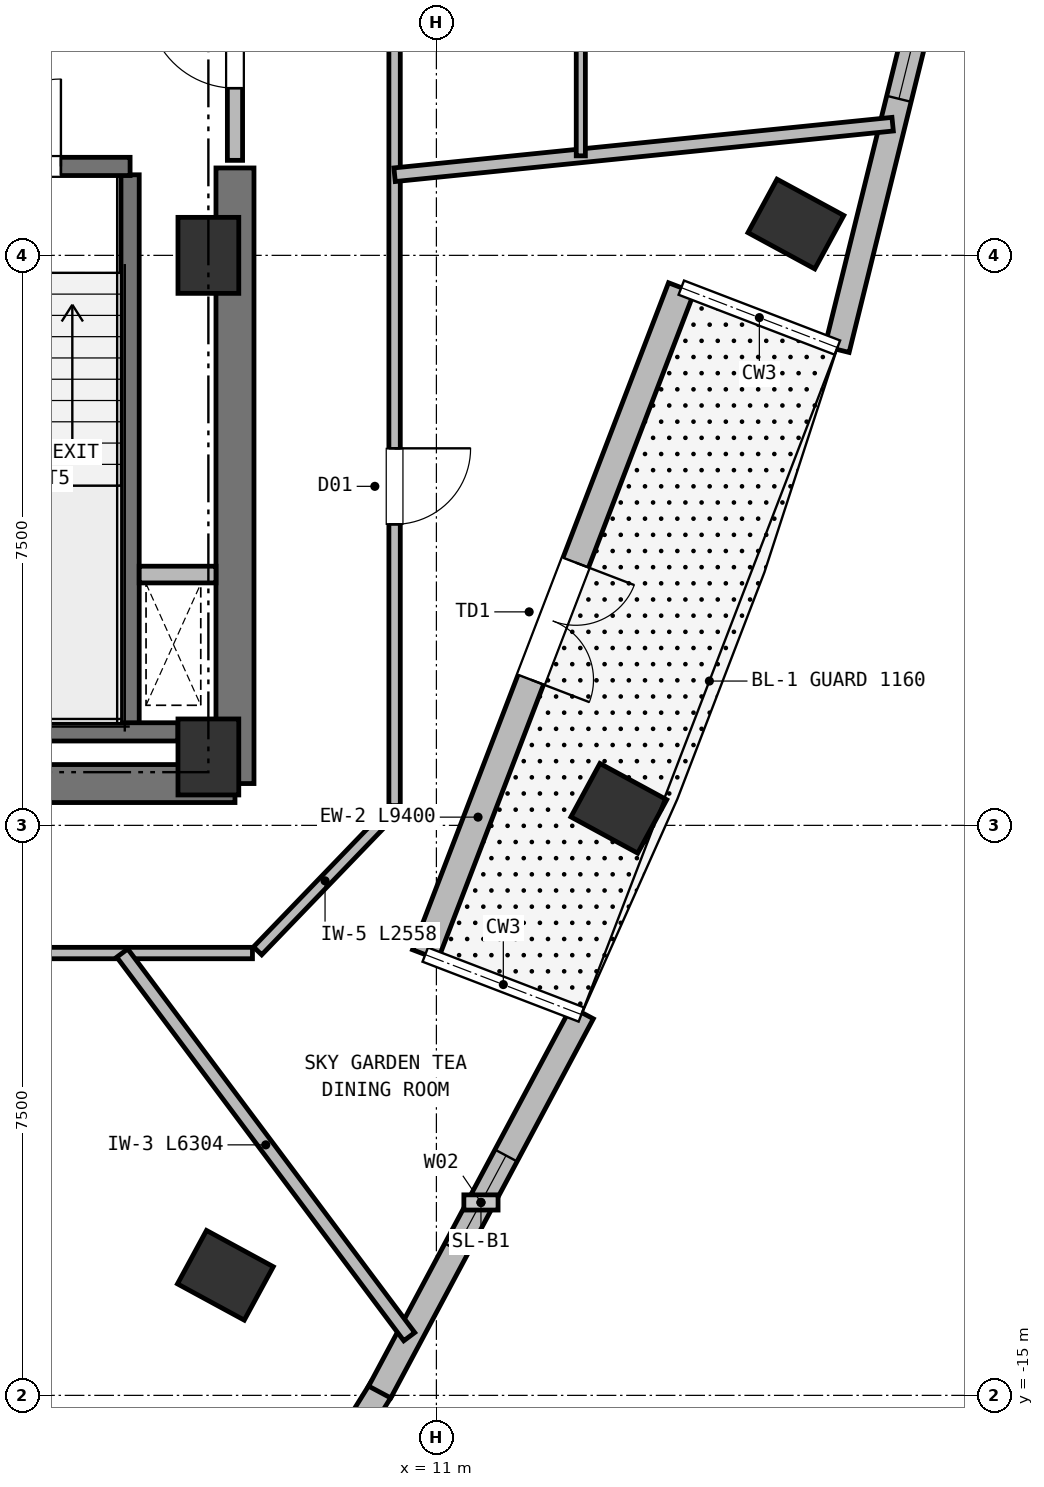
"""IFC4 building model, lengths in metres.
Left out: names, types, materials, properties, quantities, classifications, styles, units other than length and angle.
Written with IfcOpenShell. Run it as: python <this file> out.ifc"""

import sys

from ifc_helpers import new_model, si_unit, direction, frame, frame_2d, origin, origin_2d, place, context, subcontext, project, spatial, rectangle, extrude, element, fill, save


model = new_model("IFC4")
c1 = context("Model", 3, precision=1e-05, world=origin(), true_north=direction((0.0, 1.0)))
c2 = subcontext(c1, "Body", "Model", "MODEL_VIEW")
j1 = project(units=[si_unit("LENGTHUNIT", "METRE"), si_unit("PLANEANGLEUNIT", "RADIAN")], contexts=[c1])
p1 = place(None, origin())
s1 = spatial("IfcSite", under=j1, at=p1, CompositionType="ELEMENT")
p2 = place(p1, origin())
s2 = spatial("IfcBuilding", under=s1, at=p2, CompositionType="ELEMENT")
p3 = place(p2, frame((0.0, 0.0, 239.75)))
s3 = spatial("IfcBuildingStorey", under=s2, at=p3, CompositionType="ELEMENT", Elevation=239.75)
for number, where, z_axis, x_axis in (
    (1, (8.0, -6.6, 0.0), (0.0, 0.0, 1.0), (1.0, 0.0, 0.0)),
    (2, (8.0, 0.0, 0.0), (0.0, 0.0, 1.0), (1.0, 0.0, 0.0)),
):
    element("IfcColumn", number, at=place(p3, frame(where, z_axis=z_axis, x_axis=x_axis)), inside=s3, PredefinedType="COLUMN", context=c2, shape_type="SweptSolid", body=[
        extrude(rectangle(XDim=0.8, YDim=1.0, at=origin_2d()), origin(), (0.0, 0.0, 1.0), 3.8),
    ])
p4 = place(p3, frame((4.4, -6.95, 0.0), z_axis=(0.0, 0.0, 1.0), x_axis=(1.0, 0.0, 0.0)))
e3 = element("IfcWall", 3, at=p4, inside=s3, PredefinedType="SHEAR", context=c2, shape_type="SweptSolid", body=[
    extrude(rectangle(XDim=3.95, YDim=0.5, at=frame_2d((1.975, 0.0))), origin(), (0.0, 0.0, 1.0), 3.55),
])
p5 = place(p3, frame((8.35, -6.95, 0.0), z_axis=(0.0, 0.0, 1.0), x_axis=(0.0, 1.0, 0.0)))
e4 = element("IfcWall", 4, at=p5, inside=s3, PredefinedType="SHEAR", context=c2, shape_type="SweptSolid", body=[
    extrude(rectangle(XDim=8.1, YDim=0.5, at=frame_2d((4.05, 0.0))), origin(), (0.0, 0.0, 1.0), 3.55),
])
for number, where, z_axis, x_axis in (
    (5, (8.224, -13.42, 0.0), (0.0, 0.0, 1.0), (0.477, 0.879, 0.0)),
    (6, (13.4, -7.276, 0.0), (0.0, 0.0, 1.0), (0.477, 0.879, 0.0)),
    (7, (15.73, 0.412, 0.0), (0.0, 0.0, 1.0), (0.477, 0.879, 0.0)),
):
    element("IfcColumn", number, at=place(p3, frame(where, z_axis=z_axis, x_axis=x_axis)), inside=s3, PredefinedType="COLUMN", context=c2, shape_type="SweptSolid", body=[
        extrude(rectangle(XDim=0.8, YDim=1.0, at=origin_2d()), origin(), (0.0, 0.0, 1.0), 3.8),
    ])
p6 = place(p3, frame((14.222, -0.425, 0.0), z_axis=(0.0, 0.0, 1.0), x_axis=(-0.358368113904, -0.933580363406, 0.0)))
e8 = element("IfcWall", 8, at=p6, inside=s3, PredefinedType="SOLIDWALL", context=c2, shape_type="SweptSolid", body=[
    extrude(rectangle(XDim=9.4, YDim=0.36, at=frame_2d((4.7, 0.0))), origin(), (0.0, 0.0, 1.0), 3.23),
])
p7 = place(p6, frame((3.875, 0.0, 0.0)))
e9 = element("IfcOpeningElement", 9, at=p7, cuts=e8, PredefinedType="OPENING", context=c2, shape_type="SweptSolid", body=[
    extrude(rectangle(XDim=1.65, YDim=2.25, at=frame_2d((0.825, 1.125))), frame((0.0, 0.19, 0.0), z_axis=(0.0, -1.0, 0.0), x_axis=(1.0, 0.0, 0.0)), (0.0, 0.0, 1.0), 0.38),
])
p8 = place(p3, frame((10.279, -14.913, 0.0), z_axis=(0.0, 0.0, 1.0), x_axis=(-0.527573608848, -0.84950932146, 0.0)))
e10 = element("IfcWall", 10, at=p8, inside=s3, PredefinedType="SOLIDWALL", context=c2, shape_type="SweptSolid", body=[
    extrude(rectangle(XDim=2.509, YDim=0.33, at=frame_2d((1.254, 0.0))), origin(), (0.0, 0.0, 1.0), 3.55),
])
p9 = place(p8, frame((0.554, 0.0, 0.72)))
e11 = element("IfcOpeningElement", 11, at=p9, cuts=e10, PredefinedType="OPENING", context=c2, shape_type="SweptSolid", body=[
    extrude(rectangle(XDim=1.4, YDim=1.84, at=frame_2d((0.7, 0.92))), frame((0.0, 0.175, 0.0), z_axis=(0.0, -1.0, 0.0), x_axis=(1.0, 0.0, 0.0)), (0.0, 0.0, 1.0), 0.35),
])
p10 = place(p3, frame((12.919, -9.967, 0.0), z_axis=(0.0, 0.0, 1.0), x_axis=(-0.471219832314, -0.882015798971, 0.0)))
e12 = element("IfcWall", 12, at=p10, inside=s3, PredefinedType="SOLIDWALL", context=c2, shape_type="SweptSolid", body=[
    extrude(rectangle(XDim=5.657, YDim=0.33, at=frame_2d((2.828, 0.0))), origin(), (0.0, 0.0, 1.0), 3.55),
])
p11 = place(p10, frame((2.128, 0.0, 0.72)))
e13 = element("IfcOpeningElement", 13, at=p11, cuts=e12, PredefinedType="OPENING", context=c2, shape_type="SweptSolid", body=[
    extrude(rectangle(XDim=1.4, YDim=1.88, at=frame_2d((0.7, 0.94))), frame((0.0, 0.175, 0.0), z_axis=(0.0, -1.0, 0.0), x_axis=(1.0, 0.0, 0.0)), (0.0, 0.0, 1.0), 0.35),
])
p12 = place(p3, frame((17.628, 4.254, 0.0), z_axis=(0.0, 0.0, 1.0), x_axis=(-0.240006202067, -0.97077135463, 0.0)))
e14 = element("IfcWall", 14, at=p12, inside=s3, PredefinedType="SOLIDWALL", context=c2, shape_type="SweptSolid", body=[
    extrude(rectangle(XDim=5.657, YDim=0.33, at=frame_2d((2.828, 0.0))), origin(), (0.0, 0.0, 1.0), 3.55),
])
p13 = place(p12, frame((0.86, 0.0, 0.72)))
e15 = element("IfcOpeningElement", 15, at=p13, cuts=e14, PredefinedType="OPENING", context=c2, shape_type="SweptSolid", body=[
    extrude(rectangle(XDim=1.4, YDim=1.88, at=frame_2d((0.7, 0.94))), frame((0.0, 0.175, 0.0), z_axis=(0.0, -1.0, 0.0), x_axis=(1.0, 0.0, 0.0)), (0.0, 0.0, 1.0), 0.35),
])
p14 = place(p3, frame((6.97, -6.16, 0.0), z_axis=(0.0, 0.0, 1.0), x_axis=(0.0, 1.0, 0.0)))
e16 = element("IfcWall", 16, at=p14, inside=s3, PredefinedType="SHEAR", context=c2, shape_type="SweptSolid", body=[
    extrude(rectangle(XDim=7.22, YDim=0.24, at=frame_2d((3.61, 0.0))), origin(), (0.0, 0.0, 1.0), 3.55),
])
p15 = place(p3, frame((4.01, -6.27, 0.0), z_axis=(0.0, 0.0, 1.0), x_axis=(1.0, 0.0, 0.0)))
e17 = element("IfcWall", 17, at=p15, inside=s3, PredefinedType="SHEAR", context=c2, shape_type="SweptSolid", body=[
    extrude(rectangle(XDim=3.59, YDim=0.24, at=frame_2d((1.795, 0.0))), origin(), (0.0, 0.0, 1.0), 3.55),
])
p16 = place(p3, frame((4.01, 1.17, 0.0), z_axis=(0.0, 0.0, 1.0), x_axis=(1.0, 0.0, 0.0)))
e18 = element("IfcWall", 18, at=p16, inside=s3, PredefinedType="SHEAR", context=c2, shape_type="SweptSolid", body=[
    extrude(rectangle(XDim=2.96, YDim=0.24, at=frame_2d((1.48, 0.0))), origin(), (0.0, 0.0, 1.0), 3.55),
])
p17 = place(p16, frame((0.9, 0.0, 0.0)))
e19 = element("IfcOpeningElement", 19, at=p17, cuts=e18, PredefinedType="OPENING", context=c2, shape_type="SweptSolid", body=[
    extrude(rectangle(XDim=1.15, YDim=2.15, at=frame_2d((0.575, 1.075))), frame((0.0, 0.13, 0.0), z_axis=(0.0, -1.0, 0.0), x_axis=(1.0, 0.0, 0.0)), (0.0, 0.0, 1.0), 0.26),
])
p18 = place(p3, frame((7.09, -4.2, 0.0), z_axis=(0.0, 0.0, 1.0), x_axis=(1.0, 0.0, 0.0)))
e20 = element("IfcWall", 20, at=p18, inside=s3, PredefinedType="PARTITIONING", context=c2, shape_type="SweptSolid", body=[
    extrude(rectangle(XDim=1.01, YDim=0.22, at=frame_2d((0.505, 0.0))), origin(), (0.0, 0.0, 1.0), 3.55),
])
p19 = place(p3, frame((8.35, 1.25, 0.0), z_axis=(0.0, 0.0, 1.0), x_axis=(0.0, 1.0, 0.0)))
e21 = element("IfcWall", 21, at=p19, inside=s3, PredefinedType="PARTITIONING", context=c2, shape_type="SweptSolid", body=[
    extrude(rectangle(XDim=5.3, YDim=0.2, at=frame_2d((2.65, 0.0))), origin(), (0.0, 0.0, 1.0), 3.55),
])
p20 = place(p19, frame((0.95, 0.0, 0.0)))
e22 = element("IfcOpeningElement", 22, at=p20, cuts=e21, PredefinedType="OPENING", context=c2, shape_type="SweptSolid", body=[
    extrude(rectangle(XDim=1.15, YDim=2.15, at=frame_2d((0.575, 1.075))), frame((0.0, 0.11, 0.0), z_axis=(0.0, -1.0, 0.0), x_axis=(1.0, 0.0, 0.0)), (0.0, 0.0, 1.0), 0.22),
])
p21 = place(p3, frame((8.58, -9.18, 0.0), z_axis=(0.0, 0.0, 1.0), x_axis=(-1.0, 0.0, 0.0)))
e23 = element("IfcWall", 23, at=p21, inside=s3, PredefinedType="PARTITIONING", context=c2, shape_type="SweptSolid", body=[
    extrude(rectangle(XDim=17.16, YDim=0.15, at=frame_2d((8.58, 0.0))), origin(), (0.0, 0.0, 1.0), 3.23),
])
p22 = place(p21, frame((15.361, 0.0, 0.0)))
e24 = element("IfcOpeningElement", 24, at=p22, cuts=e23, PredefinedType="OPENING", context=c2, shape_type="SweptSolid", body=[
    extrude(rectangle(XDim=1.0, YDim=2.15, at=frame_2d((0.5, 1.075))), frame((0.0, 0.085, 0.0), z_axis=(0.0, -1.0, 0.0), x_axis=(1.0, 0.0, 0.0)), (0.0, 0.0, 1.0), 0.17),
])
p23 = place(p21, frame((12.947, 0.0, 0.0)))
e25 = element("IfcOpeningElement", 25, at=p23, cuts=e23, PredefinedType="OPENING", context=c2, shape_type="SweptSolid", body=[
    extrude(rectangle(XDim=0.95, YDim=2.1, at=frame_2d((0.475, 1.05))), frame((0.0, 0.085, 0.0), z_axis=(0.0, -1.0, 0.0), x_axis=(1.0, 0.0, 0.0)), (0.0, 0.0, 1.0), 0.17),
])
p24 = place(p21, frame((4.184, 0.0, 0.0)))
e26 = element("IfcOpeningElement", 26, at=p24, cuts=e23, PredefinedType="OPENING", context=c2, shape_type="SweptSolid", body=[
    extrude(rectangle(XDim=1.06, YDim=2.15, at=frame_2d((0.53, 1.075))), frame((0.0, 0.085, 0.0), z_axis=(0.0, -1.0, 0.0), x_axis=(1.0, 0.0, 0.0)), (0.0, 0.0, 1.0), 0.17),
])
p25 = place(p3, frame((10.422, -7.309, 0.0), z_axis=(0.0, 0.0, 1.0), x_axis=(-0.693764562202, -0.720201869085, 0.0)))
e27 = element("IfcWall", 27, at=p25, inside=s3, PredefinedType="PARTITIONING", context=c2, shape_type="SweptSolid", body=[
    extrude(rectangle(XDim=2.558, YDim=0.15, at=frame_2d((1.279, 0.0))), origin(), (0.0, 0.0, 1.0), 3.23),
])
p26 = place(p3, frame((10.45, 7.24, 0.0), z_axis=(0.0, 0.0, 1.0), x_axis=(0.0, -1.0, 0.0)))
e28 = element("IfcWall", 28, at=p26, inside=s3, PredefinedType="PARTITIONING", context=c2, shape_type="SweptSolid", body=[
    extrude(rectangle(XDim=14.48, YDim=0.15, at=frame_2d((7.24, 0.0))), origin(), (0.0, 0.0, 1.0), 3.55),
])
p27 = place(p26, frame((9.779, 0.0, 0.0)))
e29 = element("IfcOpeningElement", 29, at=p27, cuts=e28, PredefinedType="OPENING", context=c2, shape_type="SweptSolid", body=[
    extrude(rectangle(XDim=1.0, YDim=2.15, at=frame_2d((0.5, 1.075))), frame((0.0, 0.085, 0.0), z_axis=(0.0, -1.0, 0.0), x_axis=(1.0, 0.0, 0.0)), (0.0, 0.0, 1.0), 0.17),
])
p28 = place(p3, frame((6.867, -9.18, 0.0), z_axis=(0.0, 0.0, 1.0), x_axis=(0.598983265995, -0.800761541945, 0.0)))
e30 = element("IfcWall", 30, at=p28, inside=s3, PredefinedType="PARTITIONING", context=c2, shape_type="SweptSolid", body=[
    extrude(rectangle(XDim=6.304, YDim=0.18, at=frame_2d((3.152, 0.0))), origin(), (0.0, 0.0, 1.0), 3.55),
])
p29 = place(p3, frame((10.45, 1.061, 0.0), z_axis=(0.0, 0.0, 1.0), x_axis=(0.994889305672, 0.100971626999, 0.0)))
e31 = element("IfcWall", 31, at=p29, inside=s3, PredefinedType="PARTITIONING", context=c2, shape_type="SweptSolid", body=[
    extrude(rectangle(XDim=6.586, YDim=0.18, at=frame_2d((3.293, 0.0))), origin(), (0.0, 0.0, 1.0), 3.55),
])
p30 = place(p3, frame((12.9, 1.31, 0.0), z_axis=(0.0, 0.0, 1.0), x_axis=(0.0, 1.0, 0.0)))
e32 = element("IfcWall", 32, at=p30, inside=s3, PredefinedType="PARTITIONING", context=c2, shape_type="SweptSolid", body=[
    extrude(rectangle(XDim=6.951, YDim=0.12, at=frame_2d((3.476, 0.0))), origin(), (0.0, 0.0, 1.0), 3.55),
])
p31 = place(p7, origin())
e33 = element("IfcDoor", 33, at=p31, inside=s3, OperationType="DOUBLE_DOOR_SINGLE_SWING", PredefinedType="DOOR", context=c2, shape_type="SweptSolid", body=[
    extrude(rectangle(XDim=1.65, YDim=2.25, at=frame_2d((0.825, 1.125))), frame((0.0, 0.025, 0.0), z_axis=(0.0, -1.0, 0.0), x_axis=(1.0, 0.0, 0.0)), (0.0, 0.0, 1.0), 0.05),
])
fill(e9, e33)
p32 = place(p11, origin())
e34 = element("IfcWindow", 34, at=p32, inside=s3, PartitioningType="SINGLE_PANEL", PredefinedType="WINDOW", context=c2, shape_type="SweptSolid", body=[
    extrude(rectangle(XDim=1.4, YDim=1.88, at=frame_2d((0.7, 0.94))), frame((0.0, 0.03, 0.0), z_axis=(0.0, -1.0, 0.0), x_axis=(1.0, 0.0, 0.0)), (0.0, 0.0, 1.0), 0.06),
])
fill(e13, e34)
p33 = place(p13, origin())
e35 = element("IfcWindow", 35, at=p33, inside=s3, PartitioningType="SINGLE_PANEL", PredefinedType="WINDOW", context=c2, shape_type="SweptSolid", body=[
    extrude(rectangle(XDim=1.4, YDim=1.88, at=frame_2d((0.7, 0.94))), frame((0.0, 0.03, 0.0), z_axis=(0.0, -1.0, 0.0), x_axis=(1.0, 0.0, 0.0)), (0.0, 0.0, 1.0), 0.06),
])
fill(e15, e35)
p34 = place(p17, origin())
e36 = element("IfcDoor", 36, at=p34, inside=s3, OperationType="SINGLE_SWING_RIGHT", PredefinedType="DOOR", context=c2, shape_type="SweptSolid", body=[
    extrude(rectangle(XDim=1.15, YDim=2.15, at=frame_2d((0.575, 1.075))), frame((0.0, 0.025, 0.0), z_axis=(0.0, -1.0, 0.0), x_axis=(1.0, 0.0, 0.0)), (0.0, 0.0, 1.0), 0.05),
])
fill(e19, e36)
p35 = place(p20, origin())
e37 = element("IfcDoor", 37, at=p35, inside=s3, OperationType="SINGLE_SWING_RIGHT", PredefinedType="DOOR", context=c2, shape_type="SweptSolid", body=[
    extrude(rectangle(XDim=1.15, YDim=2.15, at=frame_2d((0.575, 1.075))), frame((0.0, 0.025, 0.0), z_axis=(0.0, -1.0, 0.0), x_axis=(1.0, 0.0, 0.0)), (0.0, 0.0, 1.0), 0.05),
])
fill(e22, e37)
p36 = place(p27, origin())
e38 = element("IfcDoor", 38, at=p36, inside=s3, OperationType="SINGLE_SWING_LEFT", PredefinedType="DOOR", context=c2, shape_type="SweptSolid", body=[
    extrude(rectangle(XDim=1.0, YDim=2.15, at=frame_2d((0.5, 1.075))), frame((0.0, 0.025, 0.0), z_axis=(0.0, -1.0, 0.0), x_axis=(1.0, 0.0, 0.0)), (0.0, 0.0, 1.0), 0.05),
])
fill(e29, e38)
save(model, sys.argv[1])
